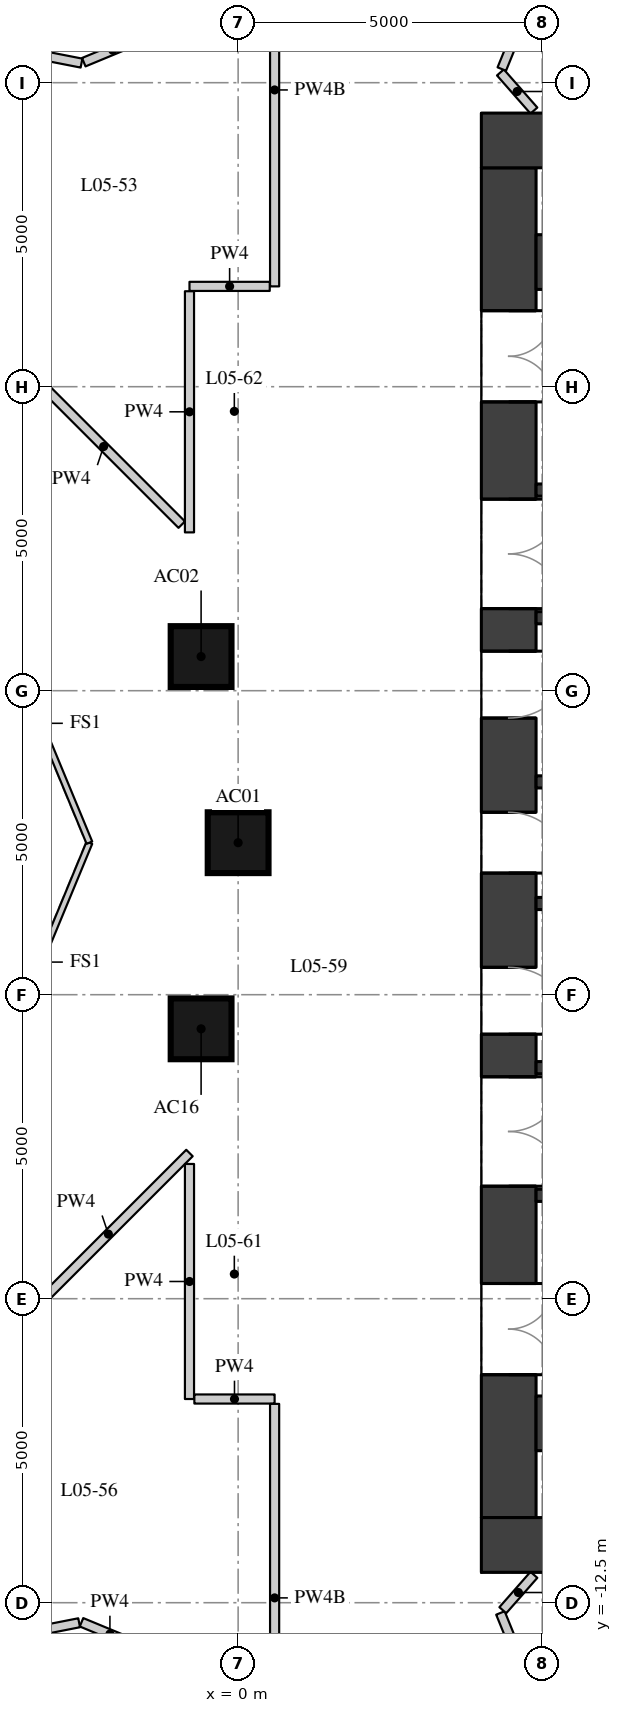
"""IFC4 building model, lengths in metres.
Left out: names, types, materials, properties, quantities, classifications, styles, units other than length and angle.
Written with IfcOpenShell. Run it as: python <this file> out.ifc"""

import sys

from ifc_helpers import new_model, si_unit, direction, frame, frame_2d, origin, origin_2d, place, context, subcontext, project, spatial, rectangle, extrude, element, fill, save


model = new_model("IFC4")
c1 = context("Model", 3, precision=1e-05, world=origin(), true_north=direction((0.0, 1.0)))
c2 = subcontext(c1, "Body", "Model", "MODEL_VIEW")
j1 = project(units=[si_unit("LENGTHUNIT", "METRE"), si_unit("PLANEANGLEUNIT", "RADIAN")], contexts=[c1])
p1 = place(None, origin())
s1 = spatial("IfcSite", under=j1, at=p1, CompositionType="ELEMENT")
p2 = place(p1, origin())
s2 = spatial("IfcBuilding", under=s1, at=p2, CompositionType="ELEMENT")
p3 = place(p2, frame((0.0, 0.0, 25.0)))
s3 = spatial("IfcBuildingStorey", under=s2, at=p3, CompositionType="ELEMENT", Elevation=25.0)
for number, where, z_axis, x_axis in (
    (1, (0.0, 0.0, 0.0), (0.0, 0.0, 1.0), (1.0, 0.0, 0.0)),
    (2, (-0.609, 3.062, 0.0), (0.0, 0.0, 1.0), (1.0, 0.0, 0.0)),
    (3, (-0.609, -3.062, 0.0), (0.0, 0.0, 1.0), (1.0, 0.0, 0.0)),
):
    element("IfcColumn", number, at=place(p3, frame(where, z_axis=z_axis, x_axis=x_axis)), inside=s3, PredefinedType="COLUMN", context=c2, shape_type="SweptSolid", body=[
        extrude(rectangle(XDim=1.0, YDim=1.0, at=origin_2d()), origin(), (0.0, 0.0, 1.0), 3.3),
    ])
p4 = place(p3, frame((4.45, -11.1, 0.0), z_axis=(0.0, 0.0, 1.0), x_axis=(0.0, 1.0, 0.0)))
e4 = element("IfcWall", 4, at=p4, inside=s3, PredefinedType="SHEAR", context=c2, shape_type="SweptSolid", body=[
    extrude(rectangle(XDim=22.2, YDim=0.9, at=frame_2d((11.1, 0.0))), origin(), (0.0, 0.0, 1.0), 3.02),
])
p5 = place(p4, frame((2.35, 0.0, 0.0)))
e5 = element("IfcOpeningElement", 5, at=p5, cuts=e4, PredefinedType="OPENING", context=c2, shape_type="SweptSolid", body=[
    extrude(rectangle(XDim=1.5, YDim=2.1, at=frame_2d((0.75, 1.05))), frame((0.0, 0.46, 0.0), z_axis=(0.0, -1.0, 0.0), x_axis=(1.0, 0.0, 0.0)), (0.0, 0.0, 1.0), 0.92),
])
p6 = place(p4, frame((5.45, 0.0, 0.0)))
e6 = element("IfcOpeningElement", 6, at=p6, cuts=e4, PredefinedType="OPENING", context=c2, shape_type="SweptSolid", body=[
    extrude(rectangle(XDim=1.8, YDim=2.1, at=frame_2d((0.9, 1.05))), frame((0.0, 0.46, 0.0), z_axis=(0.0, -1.0, 0.0), x_axis=(1.0, 0.0, 0.0)), (0.0, 0.0, 1.0), 0.92),
])
p7 = place(p4, frame((7.95, 0.0, 0.0)))
e7 = element("IfcOpeningElement", 7, at=p7, cuts=e4, PredefinedType="OPENING", context=c2, shape_type="SweptSolid", body=[
    extrude(rectangle(XDim=1.1, YDim=2.1, at=frame_2d((0.55, 1.05))), frame((0.0, 0.46, 0.0), z_axis=(0.0, -1.0, 0.0), x_axis=(1.0, 0.0, 0.0)), (0.0, 0.0, 1.0), 0.92),
])
p8 = place(p4, frame((10.6, 0.0, 0.0)))
e8 = element("IfcOpeningElement", 8, at=p8, cuts=e4, PredefinedType="OPENING", context=c2, shape_type="SweptSolid", body=[
    extrude(rectangle(XDim=1.0, YDim=2.1, at=frame_2d((0.5, 1.05))), frame((0.0, 0.46, 0.0), z_axis=(0.0, -1.0, 0.0), x_axis=(1.0, 0.0, 0.0)), (0.0, 0.0, 1.0), 0.92),
])
p9 = place(p4, frame((13.15, 0.0, 0.0)))
e9 = element("IfcOpeningElement", 9, at=p9, cuts=e4, PredefinedType="OPENING", context=c2, shape_type="SweptSolid", body=[
    extrude(rectangle(XDim=1.1, YDim=2.1, at=frame_2d((0.55, 1.05))), frame((0.0, 0.46, 0.0), z_axis=(0.0, -1.0, 0.0), x_axis=(1.0, 0.0, 0.0)), (0.0, 0.0, 1.0), 0.92),
])
p10 = place(p4, frame((14.95, 0.0, 0.0)))
e10 = element("IfcOpeningElement", 10, at=p10, cuts=e4, PredefinedType="OPENING", context=c2, shape_type="SweptSolid", body=[
    extrude(rectangle(XDim=1.8, YDim=2.1, at=frame_2d((0.9, 1.05))), frame((0.0, 0.46, 0.0), z_axis=(0.0, -1.0, 0.0), x_axis=(1.0, 0.0, 0.0)), (0.0, 0.0, 1.0), 0.92),
])
p11 = place(p4, frame((18.35, 0.0, 0.0)))
e11 = element("IfcOpeningElement", 11, at=p11, cuts=e4, PredefinedType="OPENING", context=c2, shape_type="SweptSolid", body=[
    extrude(rectangle(XDim=1.5, YDim=2.1, at=frame_2d((0.75, 1.05))), frame((0.0, 0.46, 0.0), z_axis=(0.0, -1.0, 0.0), x_axis=(1.0, 0.0, 0.0)), (0.0, 0.0, 1.0), 0.92),
])
for number, where, z_axis, x_axis in (
    (12, (4.0, 11.55, 0.0), (0.0, 0.0, 1.0), (1.0, 0.0, 0.0)),
    (13, (4.0, -11.55, 0.0), (0.0, 0.0, 1.0), (1.0, 0.0, 0.0)),
):
    element("IfcWall", number, at=place(p3, frame(where, z_axis=z_axis, x_axis=x_axis)), inside=s3, PredefinedType="SHEAR", context=c2, shape_type="SweptSolid", body=[
        extrude(rectangle(XDim=15.2, YDim=0.9, at=frame_2d((7.6, 0.0))), origin(), (0.0, 0.0, 1.0), 3.02),
    ])
for number, where, z_axis, x_axis in (
    (14, (4.9, 9.55, 0.0), (0.0, 0.0, 1.0), (1.0, 0.0, 0.0)),
    (15, (4.9, -9.55, 0.0), (0.0, 0.0, 1.0), (1.0, 0.0, 0.0)),
):
    element("IfcWall", number, at=place(p3, frame(where, z_axis=z_axis, x_axis=x_axis)), inside=s3, PredefinedType="SHEAR", context=c2, shape_type="SweptSolid", body=[
        extrude(rectangle(XDim=10.2, YDim=0.9, at=frame_2d((5.1, 0.0))), origin(), (0.0, 0.0, 1.0), 3.02),
    ])
p12 = place(p3, frame((4.9, 5.8, 0.0), z_axis=(0.0, 0.0, 1.0), x_axis=(1.0, 0.0, 0.0)))
e16 = element("IfcWall", 16, at=p12, inside=s3, PredefinedType="SHEAR", context=c2, shape_type="SweptSolid", body=[
    extrude(rectangle(XDim=10.2, YDim=0.2, at=frame_2d((5.1, 0.0))), origin(), (0.0, 0.0, 1.0), 3.02),
])
p13 = place(p12, frame((6.75, 0.0, 0.0)))
e17 = element("IfcOpeningElement", 17, at=p13, cuts=e16, PredefinedType="OPENING", context=c2, shape_type="SweptSolid", body=[
    extrude(rectangle(XDim=1.1, YDim=2.1, at=frame_2d((0.55, 1.05))), frame((0.0, 0.11, 0.0), z_axis=(0.0, -1.0, 0.0), x_axis=(1.0, 0.0, 0.0)), (0.0, 0.0, 1.0), 0.22),
])
p14 = place(p12, frame((8.75, 0.0, 0.0)))
e18 = element("IfcOpeningElement", 18, at=p14, cuts=e16, PredefinedType="OPENING", context=c2, shape_type="SweptSolid", body=[
    extrude(rectangle(XDim=1.1, YDim=2.1, at=frame_2d((0.55, 1.05))), frame((0.0, 0.11, 0.0), z_axis=(0.0, -1.0, 0.0), x_axis=(1.0, 0.0, 0.0)), (0.0, 0.0, 1.0), 0.22),
])
p15 = place(p3, frame((4.9, 3.7, 0.0), z_axis=(0.0, 0.0, 1.0), x_axis=(1.0, 0.0, 0.0)))
e19 = element("IfcWall", 19, at=p15, inside=s3, PredefinedType="SHEAR", context=c2, shape_type="SweptSolid", body=[
    extrude(rectangle(XDim=10.2, YDim=0.2, at=frame_2d((5.1, 0.0))), origin(), (0.0, 0.0, 1.0), 3.02),
])
p16 = place(p15, frame((6.3, 0.0, 0.0)))
e20 = element("IfcOpeningElement", 20, at=p16, cuts=e19, PredefinedType="OPENING", context=c2, shape_type="SweptSolid", body=[
    extrude(rectangle(XDim=1.1, YDim=2.1, at=frame_2d((0.55, 1.05))), frame((0.0, 0.11, 0.0), z_axis=(0.0, -1.0, 0.0), x_axis=(1.0, 0.0, 0.0)), (0.0, 0.0, 1.0), 0.22),
])
p17 = place(p15, frame((8.6, 0.0, 0.0)))
e21 = element("IfcOpeningElement", 21, at=p17, cuts=e19, PredefinedType="OPENING", context=c2, shape_type="SweptSolid", body=[
    extrude(rectangle(XDim=1.1, YDim=2.1, at=frame_2d((0.55, 1.05))), frame((0.0, 0.11, 0.0), z_axis=(0.0, -1.0, 0.0), x_axis=(1.0, 0.0, 0.0)), (0.0, 0.0, 1.0), 0.22),
])
for number, where, z_axis, x_axis in (
    (22, (4.9, 1.0, 0.0), (0.0, 0.0, 1.0), (1.0, 0.0, 0.0)),
    (23, (4.9, -1.0, 0.0), (0.0, 0.0, 1.0), (1.0, 0.0, 0.0)),
):
    element("IfcWall", number, at=place(p3, frame(where, z_axis=z_axis, x_axis=x_axis)), inside=s3, PredefinedType="SHEAR", context=c2, shape_type="SweptSolid", body=[
        extrude(rectangle(XDim=10.2, YDim=0.2, at=frame_2d((5.1, 0.0))), origin(), (0.0, 0.0, 1.0), 3.02),
    ])
p18 = place(p3, frame((4.9, -3.7, 0.0), z_axis=(0.0, 0.0, 1.0), x_axis=(1.0, 0.0, 0.0)))
e24 = element("IfcWall", 24, at=p18, inside=s3, PredefinedType="SHEAR", context=c2, shape_type="SweptSolid", body=[
    extrude(rectangle(XDim=10.2, YDim=0.2, at=frame_2d((5.1, 0.0))), origin(), (0.0, 0.0, 1.0), 3.02),
])
p19 = place(p18, frame((6.3, 0.0, 0.0)))
e25 = element("IfcOpeningElement", 25, at=p19, cuts=e24, PredefinedType="OPENING", context=c2, shape_type="SweptSolid", body=[
    extrude(rectangle(XDim=1.1, YDim=2.1, at=frame_2d((0.55, 1.05))), frame((0.0, 0.11, 0.0), z_axis=(0.0, -1.0, 0.0), x_axis=(1.0, 0.0, 0.0)), (0.0, 0.0, 1.0), 0.22),
])
p20 = place(p18, frame((8.6, 0.0, 0.0)))
e26 = element("IfcOpeningElement", 26, at=p20, cuts=e24, PredefinedType="OPENING", context=c2, shape_type="SweptSolid", body=[
    extrude(rectangle(XDim=1.1, YDim=2.1, at=frame_2d((0.55, 1.05))), frame((0.0, 0.11, 0.0), z_axis=(0.0, -1.0, 0.0), x_axis=(1.0, 0.0, 0.0)), (0.0, 0.0, 1.0), 0.22),
])
p21 = place(p3, frame((4.9, -5.8, 0.0), z_axis=(0.0, 0.0, 1.0), x_axis=(1.0, 0.0, 0.0)))
e27 = element("IfcWall", 27, at=p21, inside=s3, PredefinedType="SHEAR", context=c2, shape_type="SweptSolid", body=[
    extrude(rectangle(XDim=10.2, YDim=0.2, at=frame_2d((5.1, 0.0))), origin(), (0.0, 0.0, 1.0), 3.02),
])
p22 = place(p3, frame((0.6, 15.612, 0.0), z_axis=(0.0, 0.0, 1.0), x_axis=(0.0, -1.0, 0.0)))
e28 = element("IfcWall", 28, at=p22, inside=s3, PredefinedType="PARTITIONING", context=c2, shape_type="SweptSolid", body=[
    extrude(rectangle(XDim=6.462, YDim=0.15, at=frame_2d((3.231, 0.0))), origin(), (0.0, 0.0, 1.0), 2.47),
])
p23 = place(p3, frame((0.52, 9.15, 0.0), z_axis=(0.0, 0.0, 1.0), x_axis=(-1.0, 0.0, 0.0)))
e29 = element("IfcWall", 29, at=p23, inside=s3, PredefinedType="PARTITIONING", context=c2, shape_type="SweptSolid", body=[
    extrude(rectangle(XDim=1.32, YDim=0.15, at=frame_2d((0.66, 0.0))), origin(), (0.0, 0.0, 1.0), 3.02),
])
p24 = place(p3, frame((-0.8, 9.07, 0.0), z_axis=(0.0, 0.0, 1.0), x_axis=(0.0, -1.0, 0.0)))
e30 = element("IfcWall", 30, at=p24, inside=s3, PredefinedType="PARTITIONING", context=c2, shape_type="SweptSolid", body=[
    extrude(rectangle(XDim=3.966, YDim=0.15, at=frame_2d((1.983, 0.0))), origin(), (0.0, 0.0, 1.0), 3.02),
])
p25 = place(p3, frame((-0.927, 5.231, 0.0), z_axis=(0.0, 0.0, 1.0), x_axis=(-0.707106781187, 0.707106781187, 0.0)))
e31 = element("IfcWall", 31, at=p25, inside=s3, PredefinedType="PARTITIONING", context=c2, shape_type="SweptSolid", body=[
    extrude(rectangle(XDim=3.633, YDim=0.15, at=frame_2d((1.817, 0.0))), origin(), (0.0, 0.0, 1.0), 3.02),
])
p26 = place(p3, frame((-4.607, 13.22, 0.0), z_axis=(0.0, 0.0, 1.0), x_axis=(0.981304142817, -0.192463449234, 0.0)))
e32 = element("IfcWall", 32, at=p26, inside=s3, PredefinedType="PARTITIONING", context=c2, shape_type="SweptSolid", body=[
    extrude(rectangle(XDim=2.07, YDim=0.15, at=frame_2d((1.035, 0.0))), origin(), (0.0, 0.0, 1.0), 3.02),
])
p27 = place(p3, frame((-2.539, 12.837, 0.0), z_axis=(0.0, 0.0, 1.0), x_axis=(0.923768662954, 0.382950985565, 0.0)))
e33 = element("IfcWall", 33, at=p27, inside=s3, PredefinedType="PARTITIONING", context=c2, shape_type="SweptSolid", body=[
    extrude(rectangle(XDim=1.031, YDim=0.15, at=frame_2d((0.516, 0.0))), origin(), (0.0, 0.0, 1.0), 3.02),
])
p28 = place(p3, frame((4.865, 12.042, 0.0), z_axis=(0.0, 0.0, 1.0), x_axis=(-0.660014599896, 0.751252772323, 0.0)))
e34 = element("IfcWall", 34, at=p28, inside=s3, PredefinedType="PARTITIONING", context=c2, shape_type="SweptSolid", body=[
    extrude(rectangle(XDim=0.835, YDim=0.15, at=frame_2d((0.417, 0.0))), origin(), (0.0, 0.0, 1.0), 2.57),
])
p29 = place(p3, frame((4.336, 12.724, 0.0), z_axis=(0.0, 0.0, 1.0), x_axis=(0.376897652409, 0.926254910707, 0.0)))
e35 = element("IfcWall", 35, at=p29, inside=s3, PredefinedType="PARTITIONING", context=c2, shape_type="SweptSolid", body=[
    extrude(rectangle(XDim=1.962, YDim=0.15, at=frame_2d((0.981, 0.0))), origin(), (0.0, 0.0, 1.0), 3.02),
])
p30 = place(p3, frame((-1.641, -13.209, 0.0), z_axis=(0.0, 0.0, 1.0), x_axis=(-0.923725449546, 0.383055209937, 0.0)))
e36 = element("IfcWall", 36, at=p30, inside=s3, PredefinedType="PARTITIONING", context=c2, shape_type="SweptSolid", body=[
    extrude(rectangle(XDim=1.011, YDim=0.15, at=frame_2d((0.506, 0.0))), origin(), (0.0, 0.0, 1.0), 3.02),
])
p31 = place(p3, frame((-2.615, -12.83, 0.0), z_axis=(0.0, 0.0, 1.0), x_axis=(-0.981297312652, -0.192498270593, 0.0)))
e37 = element("IfcWall", 37, at=p31, inside=s3, PredefinedType="PARTITIONING", context=c2, shape_type="SweptSolid", body=[
    extrude(rectangle(XDim=2.09, YDim=0.15, at=frame_2d((1.045, 0.0))), origin(), (0.0, 0.0, 1.0), 3.02),
])
p32 = place(p3, frame((-3.468, -7.772, 0.0), z_axis=(0.0, 0.0, 1.0), x_axis=(0.707106781187, 0.707106781187, 0.0)))
e38 = element("IfcWall", 38, at=p32, inside=s3, PredefinedType="PARTITIONING", context=c2, shape_type="SweptSolid", body=[
    extrude(rectangle(XDim=3.773, YDim=0.15, at=frame_2d((1.887, 0.0))), origin(), (0.0, 0.0, 1.0), 3.02),
])
p33 = place(p3, frame((-0.8, -5.284, 0.0), z_axis=(0.0, 0.0, 1.0), x_axis=(0.0, -1.0, 0.0)))
e39 = element("IfcWall", 39, at=p33, inside=s3, PredefinedType="PARTITIONING", context=c2, shape_type="SweptSolid", body=[
    extrude(rectangle(XDim=3.866, YDim=0.15, at=frame_2d((1.933, 0.0))), origin(), (0.0, 0.0, 1.0), 3.02),
])
p34 = place(p3, frame((-0.72, -9.15, 0.0), z_axis=(0.0, 0.0, 1.0), x_axis=(1.0, 0.0, 0.0)))
e40 = element("IfcWall", 40, at=p34, inside=s3, PredefinedType="PARTITIONING", context=c2, shape_type="SweptSolid", body=[
    extrude(rectangle(XDim=1.32, YDim=0.15, at=frame_2d((0.66, 0.0))), origin(), (0.0, 0.0, 1.0), 3.02),
])
p35 = place(p3, frame((0.6, -9.23, 0.0), z_axis=(0.0, 0.0, 1.0), x_axis=(0.0, -1.0, 0.0)))
e41 = element("IfcWall", 41, at=p35, inside=s3, PredefinedType="PARTITIONING", context=c2, shape_type="SweptSolid", body=[
    extrude(rectangle(XDim=6.382, YDim=0.15, at=frame_2d((3.191, 0.0))), origin(), (0.0, 0.0, 1.0), 2.47),
])
p36 = place(p3, frame((5.045, -14.468, 0.0), z_axis=(0.0, 0.0, 1.0), x_axis=(-0.376889538578, 0.926258212223, 0.0)))
e42 = element("IfcWall", 42, at=p36, inside=s3, PredefinedType="PARTITIONING", context=c2, shape_type="SweptSolid", body=[
    extrude(rectangle(XDim=1.942, YDim=0.15, at=frame_2d((0.971, 0.0))), origin(), (0.0, 0.0, 1.0), 3.02),
])
p37 = place(p3, frame((4.353, -12.623, 0.0), z_axis=(0.0, 0.0, 1.0), x_axis=(0.660265480509, 0.751032286422, 0.0)))
e43 = element("IfcWall", 43, at=p37, inside=s3, PredefinedType="PARTITIONING", context=c2, shape_type="SweptSolid", body=[
    extrude(rectangle(XDim=0.775, YDim=0.15, at=frame_2d((0.387, 0.0))), origin(), (0.0, 0.0, 1.0), 2.57),
])
for number, where, z_axis, x_axis in (
    (44, (-2.446, 0.0, 0.0), (0.0, 0.0, 1.0), (-0.383, -0.924, 0.0)),
    (45, (-4.073, 3.927, 0.0), (0.0, 0.0, 1.0), (0.383, -0.924, 0.0)),
):
    element("IfcWall", number, at=place(p3, frame(where, z_axis=z_axis, x_axis=x_axis)), inside=s3, PredefinedType="PARTITIONING", context=c2, shape_type="SweptSolid", body=[
        extrude(rectangle(XDim=4.251, YDim=0.1, at=frame_2d((2.125, 0.0))), origin(), (0.0, 0.0, 1.0), 3.02),
    ])
p38 = place(p5, origin())
e46 = element("IfcDoor", 46, at=p38, inside=s3, OperationType="DOUBLE_DOOR_SINGLE_SWING", PredefinedType="DOOR", context=c2, shape_type="SweptSolid", body=[
    extrude(rectangle(XDim=1.5, YDim=2.1, at=frame_2d((0.75, 1.05))), frame((0.0, 0.025, 0.0), z_axis=(0.0, -1.0, 0.0), x_axis=(1.0, 0.0, 0.0)), (0.0, 0.0, 1.0), 0.05),
])
fill(e5, e46)
p39 = place(p6, origin())
e47 = element("IfcDoor", 47, at=p39, inside=s3, OperationType="DOUBLE_DOOR_SINGLE_SWING", PredefinedType="DOOR", context=c2, shape_type="SweptSolid", body=[
    extrude(rectangle(XDim=1.8, YDim=2.1, at=frame_2d((0.9, 1.05))), frame((0.0, 0.025, 0.0), z_axis=(0.0, -1.0, 0.0), x_axis=(1.0, 0.0, 0.0)), (0.0, 0.0, 1.0), 0.05),
])
fill(e6, e47)
p40 = place(p7, origin())
e48 = element("IfcDoor", 48, at=p40, inside=s3, OperationType="SINGLE_SWING_RIGHT", PredefinedType="DOOR", context=c2, shape_type="SweptSolid", body=[
    extrude(rectangle(XDim=1.1, YDim=2.1, at=frame_2d((0.55, 1.05))), frame((0.0, 0.025, 0.0), z_axis=(0.0, -1.0, 0.0), x_axis=(1.0, 0.0, 0.0)), (0.0, 0.0, 1.0), 0.05),
])
fill(e7, e48)
p41 = place(p8, origin())
e49 = element("IfcDoor", 49, at=p41, inside=s3, OperationType="SINGLE_SWING_RIGHT", PredefinedType="DOOR", context=c2, shape_type="SweptSolid", body=[
    extrude(rectangle(XDim=1.0, YDim=2.1, at=frame_2d((0.5, 1.05))), frame((0.0, 0.025, 0.0), z_axis=(0.0, -1.0, 0.0), x_axis=(1.0, 0.0, 0.0)), (0.0, 0.0, 1.0), 0.05),
])
fill(e8, e49)
p42 = place(p9, origin())
e50 = element("IfcDoor", 50, at=p42, inside=s3, OperationType="SINGLE_SWING_LEFT", PredefinedType="DOOR", context=c2, shape_type="SweptSolid", body=[
    extrude(rectangle(XDim=1.1, YDim=2.1, at=frame_2d((0.55, 1.05))), frame((0.0, 0.025, 0.0), z_axis=(0.0, -1.0, 0.0), x_axis=(1.0, 0.0, 0.0)), (0.0, 0.0, 1.0), 0.05),
])
fill(e9, e50)
p43 = place(p10, origin())
e51 = element("IfcDoor", 51, at=p43, inside=s3, OperationType="DOUBLE_DOOR_SINGLE_SWING", PredefinedType="DOOR", context=c2, shape_type="SweptSolid", body=[
    extrude(rectangle(XDim=1.8, YDim=2.1, at=frame_2d((0.9, 1.05))), frame((0.0, 0.025, 0.0), z_axis=(0.0, -1.0, 0.0), x_axis=(1.0, 0.0, 0.0)), (0.0, 0.0, 1.0), 0.05),
])
fill(e10, e51)
p44 = place(p11, origin())
e52 = element("IfcDoor", 52, at=p44, inside=s3, OperationType="DOUBLE_DOOR_SINGLE_SWING", PredefinedType="DOOR", context=c2, shape_type="SweptSolid", body=[
    extrude(rectangle(XDim=1.5, YDim=2.1, at=frame_2d((0.75, 1.05))), frame((0.0, 0.025, 0.0), z_axis=(0.0, -1.0, 0.0), x_axis=(1.0, 0.0, 0.0)), (0.0, 0.0, 1.0), 0.05),
])
fill(e11, e52)
save(model, sys.argv[1])
